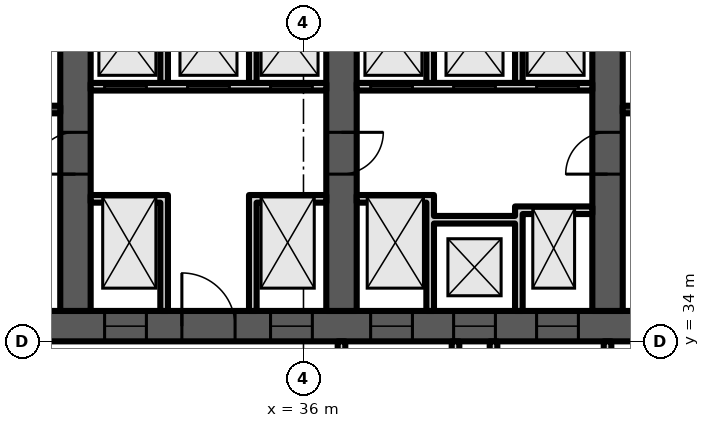
"""IFC4 building model, lengths in metres.
Left out: names, types, materials, properties, quantities, classifications, styles, units other than length and angle.
Written with IfcOpenShell. Run it as: python <this file> out.ifc"""

import sys

from ifc_helpers import new_model, si_unit, direction, frame, frame_2d, origin, place, context, subcontext, project, spatial, polyline, rectangle, outline, extrude, element, fill, save


model = new_model("IFC4")
c1 = context("Model", 3, precision=1e-05, world=origin(), true_north=direction((0.0, 1.0)))
c2 = subcontext(c1, "Body", "Model", "MODEL_VIEW")
j1 = project(units=[si_unit("LENGTHUNIT", "METRE"), si_unit("PLANEANGLEUNIT", "RADIAN")], contexts=[c1])
p1 = place(None, origin())
s1 = spatial("IfcSite", under=j1, at=p1, CompositionType="ELEMENT")
p2 = place(p1, origin())
s2 = spatial("IfcBuilding", under=s1, at=p2, CompositionType="ELEMENT")
p3 = place(p2, frame((0.0, 0.0, 177.1)))
s3 = spatial("IfcBuildingStorey", under=s2, at=p3, CompositionType="ELEMENT", Elevation=177.1)
p4 = place(p3, frame((16.0, 34.4, 0.0), z_axis=(0.0, 0.0, 1.0), x_axis=(1.0, 0.0, 0.0)))
e1 = element("IfcWall", 1, at=p4, inside=s3, PredefinedType="SHEAR", context=c2, shape_type="SweptSolid", body=[
    extrude(rectangle(XDim=42.0, YDim=0.8, at=frame_2d((21.0, 0.0))), origin(), (0.0, 0.0, 1.0), 3.6),
])
p5 = place(p4, frame((1.75, 0.0, 0.0)))
e2 = element("IfcOpeningElement", 2, at=p5, cuts=e1, PredefinedType="OPENING", context=c2, shape_type="SweptSolid", body=[
    extrude(rectangle(XDim=1.0, YDim=2.1, at=frame_2d((0.5, 1.05))), frame((0.0, 0.41, 0.0), z_axis=(0.0, -1.0, 0.0), x_axis=(1.0, 0.0, 0.0)), (0.0, 0.0, 1.0), 0.82),
])
p6 = place(p4, frame((4.65, 0.0, 0.0)))
e3 = element("IfcOpeningElement", 3, at=p6, cuts=e1, PredefinedType="OPENING", context=c2, shape_type="SweptSolid", body=[
    extrude(rectangle(XDim=1.0, YDim=2.1, at=frame_2d((0.5, 1.05))), frame((0.0, 0.41, 0.0), z_axis=(0.0, -1.0, 0.0), x_axis=(1.0, 0.0, 0.0)), (0.0, 0.0, 1.0), 0.82),
])
p7 = place(p4, frame((7.65, 0.0, 0.0)))
e4 = element("IfcOpeningElement", 4, at=p7, cuts=e1, PredefinedType="OPENING", context=c2, shape_type="SweptSolid", body=[
    extrude(rectangle(XDim=1.2, YDim=2.1, at=frame_2d((0.6, 1.05))), frame((0.0, 0.41, 0.0), z_axis=(0.0, -1.0, 0.0), x_axis=(1.0, 0.0, 0.0)), (0.0, 0.0, 1.0), 0.82),
])
p8 = place(p4, frame((14.767, 0.0, 0.0)))
e5 = element("IfcOpeningElement", 5, at=p8, cuts=e1, PredefinedType="OPENING", context=c2, shape_type="SweptSolid", body=[
    extrude(rectangle(XDim=1.1, YDim=2.1, at=frame_2d((0.55, 1.05))), frame((0.0, 0.41, 0.0), z_axis=(0.0, -1.0, 0.0), x_axis=(1.0, 0.0, 0.0)), (0.0, 0.0, 1.0), 0.82),
])
p9 = place(p4, frame((19.133, 0.0, 0.0)))
e6 = element("IfcOpeningElement", 6, at=p9, cuts=e1, PredefinedType="OPENING", context=c2, shape_type="SweptSolid", body=[
    extrude(rectangle(XDim=1.1, YDim=2.1, at=frame_2d((0.55, 1.05))), frame((0.0, 0.41, 0.0), z_axis=(0.0, -1.0, 0.0), x_axis=(1.0, 0.0, 0.0)), (0.0, 0.0, 1.0), 0.82),
])
p10 = place(p4, frame((16.8, 0.0, 0.0)))
e7 = element("IfcOpeningElement", 7, at=p10, cuts=e1, PredefinedType="OPENING", context=c2, shape_type="SweptSolid", body=[
    extrude(rectangle(XDim=1.4, YDim=2.1, at=frame_2d((0.7, 1.05))), frame((0.0, 0.41, 0.0), z_axis=(0.0, -1.0, 0.0), x_axis=(1.0, 0.0, 0.0)), (0.0, 0.0, 1.0), 0.82),
])
p11 = place(p4, frame((21.767, 0.0, 0.0)))
e8 = element("IfcOpeningElement", 8, at=p11, cuts=e1, PredefinedType="OPENING", context=c2, shape_type="SweptSolid", body=[
    extrude(rectangle(XDim=1.1, YDim=2.1, at=frame_2d((0.55, 1.05))), frame((0.0, 0.41, 0.0), z_axis=(0.0, -1.0, 0.0), x_axis=(1.0, 0.0, 0.0)), (0.0, 0.0, 1.0), 0.82),
])
p12 = place(p4, frame((23.95, 0.0, 0.0)))
e9 = element("IfcOpeningElement", 9, at=p12, cuts=e1, PredefinedType="OPENING", context=c2, shape_type="SweptSolid", body=[
    extrude(rectangle(XDim=1.1, YDim=2.1, at=frame_2d((0.55, 1.05))), frame((0.0, 0.41, 0.0), z_axis=(0.0, -1.0, 0.0), x_axis=(1.0, 0.0, 0.0)), (0.0, 0.0, 1.0), 0.82),
])
p13 = place(p4, frame((26.133, 0.0, 0.0)))
e10 = element("IfcOpeningElement", 10, at=p13, cuts=e1, PredefinedType="OPENING", context=c2, shape_type="SweptSolid", body=[
    extrude(rectangle(XDim=1.1, YDim=2.1, at=frame_2d((0.55, 1.05))), frame((0.0, 0.41, 0.0), z_axis=(0.0, -1.0, 0.0), x_axis=(1.0, 0.0, 0.0)), (0.0, 0.0, 1.0), 0.82),
])
p14 = place(p4, frame((33.15, 0.0, 0.0)))
e11 = element("IfcOpeningElement", 11, at=p14, cuts=e1, PredefinedType="OPENING", context=c2, shape_type="SweptSolid", body=[
    extrude(rectangle(XDim=1.2, YDim=2.1, at=frame_2d((0.6, 1.05))), frame((0.0, 0.41, 0.0), z_axis=(0.0, -1.0, 0.0), x_axis=(1.0, 0.0, 0.0)), (0.0, 0.0, 1.0), 0.82),
])
p15 = place(p4, frame((35.817, 0.0, 0.0)))
e12 = element("IfcOpeningElement", 12, at=p15, cuts=e1, PredefinedType="OPENING", context=c2, shape_type="SweptSolid", body=[
    extrude(rectangle(XDim=1.0, YDim=2.1, at=frame_2d((0.5, 1.05))), frame((0.0, 0.41, 0.0), z_axis=(0.0, -1.0, 0.0), x_axis=(1.0, 0.0, 0.0)), (0.0, 0.0, 1.0), 0.82),
])
p16 = place(p4, frame((39.95, 0.0, 0.0)))
e13 = element("IfcOpeningElement", 13, at=p16, cuts=e1, PredefinedType="OPENING", context=c2, shape_type="SweptSolid", body=[
    extrude(rectangle(XDim=1.0, YDim=2.1, at=frame_2d((0.5, 1.05))), frame((0.0, 0.41, 0.0), z_axis=(0.0, -1.0, 0.0), x_axis=(1.0, 0.0, 0.0)), (0.0, 0.0, 1.0), 0.82),
])
p17 = place(p4, frame((37.767, 0.0, 0.0)))
e14 = element("IfcOpeningElement", 14, at=p17, cuts=e1, PredefinedType="OPENING", context=c2, shape_type="SweptSolid", body=[
    extrude(rectangle(XDim=1.4, YDim=2.1, at=frame_2d((0.7, 1.05))), frame((0.0, 0.41, 0.0), z_axis=(0.0, -1.0, 0.0), x_axis=(1.0, 0.0, 0.0)), (0.0, 0.0, 1.0), 0.82),
])
p18 = place(p3, frame((30.0, 34.8, 0.0), z_axis=(0.0, 0.0, 1.0), x_axis=(0.0, 1.0, 0.0)))
e15 = element("IfcWall", 15, at=p18, inside=s3, PredefinedType="SHEAR", context=c2, shape_type="SweptSolid", body=[
    extrude(rectangle(XDim=14.374, YDim=0.8, at=frame_2d((7.187, 0.0))), origin(), (0.0, 0.0, 1.0), 3.6),
])
p19 = place(p18, frame((3.6, 0.0, 0.0)))
e16 = element("IfcOpeningElement", 16, at=p19, cuts=e15, PredefinedType="OPENING", context=c2, shape_type="SweptSolid", body=[
    extrude(rectangle(XDim=1.1, YDim=2.1, at=frame_2d((0.55, 1.05))), frame((0.0, 0.41, 0.0), z_axis=(0.0, -1.0, 0.0), x_axis=(1.0, 0.0, 0.0)), (0.0, 0.0, 1.0), 0.82),
])
p20 = place(p3, frame((37.0, 34.8, 0.0), z_axis=(0.0, 0.0, 1.0), x_axis=(0.0, 1.0, 0.0)))
e17 = element("IfcWall", 17, at=p20, inside=s3, PredefinedType="SHEAR", context=c2, shape_type="SweptSolid", body=[
    extrude(rectangle(XDim=14.987, YDim=0.8, at=frame_2d((7.493, 0.0))), origin(), (0.0, 0.0, 1.0), 3.6),
])
p21 = place(p20, frame((11.312, 0.0, 0.0)))
e18 = element("IfcOpeningElement", 18, at=p21, cuts=e17, PredefinedType="OPENING", context=c2, shape_type="SweptSolid", body=[
    extrude(rectangle(XDim=1.0, YDim=2.1, at=frame_2d((0.5, 1.05))), frame((0.0, 0.41, 0.0), z_axis=(0.0, -1.0, 0.0), x_axis=(1.0, 0.0, 0.0)), (0.0, 0.0, 1.0), 0.82),
])
p22 = place(p20, frame((3.6, 0.0, 0.0)))
e19 = element("IfcOpeningElement", 19, at=p22, cuts=e17, PredefinedType="OPENING", context=c2, shape_type="SweptSolid", body=[
    extrude(rectangle(XDim=1.1, YDim=2.1, at=frame_2d((0.55, 1.05))), frame((0.0, 0.41, 0.0), z_axis=(0.0, -1.0, 0.0), x_axis=(1.0, 0.0, 0.0)), (0.0, 0.0, 1.0), 0.82),
])
p23 = place(p3, frame((44.0, 34.8, 0.0), z_axis=(0.0, 0.0, 1.0), x_axis=(0.0, 1.0, 0.0)))
e20 = element("IfcWall", 20, at=p23, inside=s3, PredefinedType="SHEAR", context=c2, shape_type="SweptSolid", body=[
    extrude(rectangle(XDim=14.374, YDim=0.8, at=frame_2d((7.187, 0.0))), origin(), (0.0, 0.0, 1.0), 3.6),
])
p24 = place(p23, frame((11.312, 0.0, 0.0)))
e21 = element("IfcOpeningElement", 21, at=p24, cuts=e20, PredefinedType="OPENING", context=c2, shape_type="SweptSolid", body=[
    extrude(rectangle(XDim=1.0, YDim=2.1, at=frame_2d((0.5, 1.05))), frame((0.0, 0.41, 0.0), z_axis=(0.0, -1.0, 0.0), x_axis=(1.0, 0.0, 0.0)), (0.0, 0.0, 1.0), 0.82),
])
p25 = place(p23, frame((3.6, 0.0, 0.0)))
e22 = element("IfcOpeningElement", 22, at=p25, cuts=e20, PredefinedType="OPENING", context=c2, shape_type="SweptSolid", body=[
    extrude(rectangle(XDim=1.1, YDim=2.1, at=frame_2d((0.55, 1.05))), frame((0.0, 0.41, 0.0), z_axis=(0.0, -1.0, 0.0), x_axis=(1.0, 0.0, 0.0)), (0.0, 0.0, 1.0), 0.82),
])
p26 = place(p3, frame((23.4, 40.1, 0.0), z_axis=(0.0, 0.0, 1.0), x_axis=(1.0, 0.0, 0.0)))
e23 = element("IfcWall", 23, at=p26, inside=s3, PredefinedType="SHEAR", context=c2, shape_type="SweptSolid", body=[
    extrude(rectangle(XDim=6.2, YDim=0.2, at=frame_2d((3.1, 0.0))), origin(), (0.0, 0.0, 1.0), 3.2),
])
p27 = place(p26, frame((3.525, 0.0, 0.0)))
e24 = element("IfcOpeningElement", 24, at=p27, cuts=e23, PredefinedType="OPENING", context=c2, shape_type="SweptSolid", body=[
    extrude(rectangle(XDim=1.2, YDim=2.1, at=frame_2d((0.6, 1.05))), frame((0.0, 0.11, 0.0), z_axis=(0.0, -1.0, 0.0), x_axis=(1.0, 0.0, 0.0)), (0.0, 0.0, 1.0), 0.22),
])
p28 = place(p26, frame((0.575, 0.0, 0.0)))
e25 = element("IfcOpeningElement", 25, at=p28, cuts=e23, PredefinedType="OPENING", context=c2, shape_type="SweptSolid", body=[
    extrude(rectangle(XDim=0.9, YDim=2.1, at=frame_2d((0.45, 1.05))), frame((0.0, 0.11, 0.0), z_axis=(0.0, -1.0, 0.0), x_axis=(1.0, 0.0, 0.0)), (0.0, 0.0, 1.0), 0.22),
])
p29 = place(p3, frame((30.4, 40.7, 0.0), z_axis=(0.0, 0.0, 1.0), x_axis=(1.0, 0.0, 0.0)))
e26 = element("IfcWall", 26, at=p29, inside=s3, PredefinedType="PARTITIONING", context=c2, shape_type="SweptSolid", body=[
    extrude(rectangle(XDim=6.2, YDim=0.2, at=frame_2d((3.1, 0.0))), origin(), (0.0, 0.0, 1.0), 3.2),
])
p30 = place(p29, frame((0.367, 0.0, 0.0)))
e27 = element("IfcOpeningElement", 27, at=p30, cuts=e26, PredefinedType="OPENING", context=c2, shape_type="SweptSolid", body=[
    extrude(rectangle(XDim=1.1, YDim=2.1, at=frame_2d((0.55, 1.05))), frame((0.0, 0.11, 0.0), z_axis=(0.0, -1.0, 0.0), x_axis=(1.0, 0.0, 0.0)), (0.0, 0.0, 1.0), 0.22),
])
p31 = place(p29, frame((2.55, 0.0, 0.0)))
e28 = element("IfcOpeningElement", 28, at=p31, cuts=e26, PredefinedType="OPENING", context=c2, shape_type="SweptSolid", body=[
    extrude(rectangle(XDim=1.1, YDim=2.1, at=frame_2d((0.55, 1.05))), frame((0.0, 0.11, 0.0), z_axis=(0.0, -1.0, 0.0), x_axis=(1.0, 0.0, 0.0)), (0.0, 0.0, 1.0), 0.22),
])
p32 = place(p29, frame((4.733, 0.0, 0.0)))
e29 = element("IfcOpeningElement", 29, at=p32, cuts=e26, PredefinedType="OPENING", context=c2, shape_type="SweptSolid", body=[
    extrude(rectangle(XDim=1.1, YDim=2.1, at=frame_2d((0.55, 1.05))), frame((0.0, 0.11, 0.0), z_axis=(0.0, -1.0, 0.0), x_axis=(1.0, 0.0, 0.0)), (0.0, 0.0, 1.0), 0.22),
])
p33 = place(p3, frame((0.0, 0.0, -0.0)))
e30 = element("IfcWall", 30, at=p33, inside=s3, PredefinedType="PARTITIONING", context=c2, shape_type="SweptSolid", body=[
    extrude(outline(polyline([(32.233, 37.65), (30.4, 37.65), (30.4, 37.85), (32.233, 37.85), (32.433, 37.85), (32.433, 34.8), (32.233, 34.8), (32.233, 37.65)])), origin(), (0.0, 0.0, 1.0), 3.2),
])
p34 = place(p3, frame((0.0, 0.0, -0.0)))
e31 = element("IfcWall", 31, at=p34, inside=s3, PredefinedType="PARTITIONING", context=c2, shape_type="SweptSolid", body=[
    extrude(outline(polyline([(34.567, 37.85), (34.767, 37.85), (36.6, 37.85), (36.6, 37.65), (34.767, 37.65), (34.767, 34.8), (34.567, 34.8), (34.567, 37.85)])), origin(), (0.0, 0.0, 1.0), 3.2),
])
p35 = place(p3, frame((0.0, 0.0, -0.0)))
e32 = element("IfcWall", 32, at=p35, inside=s3, PredefinedType="PARTITIONING", context=c2, shape_type="SweptSolid", body=[
    extrude(outline(polyline([(32.433, 40.8), (32.233, 40.8), (32.233, 43.8), (30.4, 43.8), (30.4, 44.0), (36.6, 44.0), (36.6, 43.8), (34.767, 43.8), (34.767, 40.8), (34.567, 40.8), (34.567, 43.8), (32.433, 43.8), (32.433, 40.8)])), origin(), (0.0, 0.0, 1.0), 3.2),
])
p36 = place(p3, frame((37.4, 40.7, 0.0), z_axis=(0.0, 0.0, 1.0), x_axis=(1.0, 0.0, 0.0)))
e33 = element("IfcWall", 33, at=p36, inside=s3, PredefinedType="PARTITIONING", context=c2, shape_type="SweptSolid", body=[
    extrude(rectangle(XDim=6.2, YDim=0.2, at=frame_2d((3.1, 0.0))), origin(), (0.0, 0.0, 1.0), 3.2),
])
p37 = place(p36, frame((0.367, 0.0, 0.0)))
e34 = element("IfcOpeningElement", 34, at=p37, cuts=e33, PredefinedType="OPENING", context=c2, shape_type="SweptSolid", body=[
    extrude(rectangle(XDim=1.1, YDim=2.1, at=frame_2d((0.55, 1.05))), frame((0.0, 0.11, 0.0), z_axis=(0.0, -1.0, 0.0), x_axis=(1.0, 0.0, 0.0)), (0.0, 0.0, 1.0), 0.22),
])
p38 = place(p36, frame((2.55, 0.0, 0.0)))
e35 = element("IfcOpeningElement", 35, at=p38, cuts=e33, PredefinedType="OPENING", context=c2, shape_type="SweptSolid", body=[
    extrude(rectangle(XDim=1.1, YDim=2.1, at=frame_2d((0.55, 1.05))), frame((0.0, 0.11, 0.0), z_axis=(0.0, -1.0, 0.0), x_axis=(1.0, 0.0, 0.0)), (0.0, 0.0, 1.0), 0.22),
])
p39 = place(p36, frame((4.733, 0.0, 0.0)))
e36 = element("IfcOpeningElement", 36, at=p39, cuts=e33, PredefinedType="OPENING", context=c2, shape_type="SweptSolid", body=[
    extrude(rectangle(XDim=1.1, YDim=2.1, at=frame_2d((0.55, 1.05))), frame((0.0, 0.11, 0.0), z_axis=(0.0, -1.0, 0.0), x_axis=(1.0, 0.0, 0.0)), (0.0, 0.0, 1.0), 0.22),
])
p40 = place(p3, frame((0.0, 0.0, -0.0)))
e37 = element("IfcWall", 37, at=p40, inside=s3, PredefinedType="PARTITIONING", context=c2, shape_type="SweptSolid", body=[
    extrude(outline(polyline([(41.567, 37.1), (39.433, 37.1), (39.433, 34.8), (39.233, 34.8), (39.233, 37.65), (37.4, 37.65), (37.4, 37.85), (39.233, 37.85), (39.433, 37.85), (39.433, 37.3), (41.567, 37.3), (41.567, 37.55), (41.767, 37.55), (43.6, 37.55), (43.6, 37.35), (41.767, 37.35), (41.767, 34.8), (41.567, 34.8), (41.567, 37.1)])), origin(), (0.0, 0.0, 1.0), 3.2),
])
p41 = place(p3, frame((0.0, 0.0, -0.0)))
e38 = element("IfcWall", 38, at=p41, inside=s3, PredefinedType="PARTITIONING", context=c2, shape_type="SweptSolid", body=[
    extrude(outline(polyline([(39.433, 40.8), (39.233, 40.8), (39.233, 43.8), (37.4, 43.8), (37.4, 44.0), (43.6, 44.0), (43.6, 43.8), (41.767, 43.8), (41.767, 40.8), (41.567, 40.8), (41.567, 43.8), (39.433, 43.8), (39.433, 40.8)])), origin(), (0.0, 0.0, 1.0), 3.2),
])
p42 = place(p3, frame((44.4, 40.1, 0.0), z_axis=(0.0, 0.0, 1.0), x_axis=(1.0, 0.0, 0.0)))
e39 = element("IfcWall", 39, at=p42, inside=s3, PredefinedType="SHEAR", context=c2, shape_type="SweptSolid", body=[
    extrude(rectangle(XDim=6.2, YDim=0.2, at=frame_2d((3.1, 0.0))), origin(), (0.0, 0.0, 1.0), 3.2),
])
p43 = place(p42, frame((3.525, 0.0, 0.0)))
e40 = element("IfcOpeningElement", 40, at=p43, cuts=e39, PredefinedType="OPENING", context=c2, shape_type="SweptSolid", body=[
    extrude(rectangle(XDim=1.2, YDim=2.1, at=frame_2d((0.6, 1.05))), frame((0.0, 0.11, 0.0), z_axis=(0.0, -1.0, 0.0), x_axis=(1.0, 0.0, 0.0)), (0.0, 0.0, 1.0), 0.22),
])
p44 = place(p42, frame((0.575, 0.0, 0.0)))
e41 = element("IfcOpeningElement", 41, at=p44, cuts=e39, PredefinedType="OPENING", context=c2, shape_type="SweptSolid", body=[
    extrude(rectangle(XDim=0.9, YDim=2.1, at=frame_2d((0.45, 1.05))), frame((0.0, 0.11, 0.0), z_axis=(0.0, -1.0, 0.0), x_axis=(1.0, 0.0, 0.0)), (0.0, 0.0, 1.0), 0.22),
])
p45 = place(p3, frame((37.0, 30.5, 0.0), z_axis=(0.0, 0.0, 1.0), x_axis=(0.0, 1.0, 0.0)))
e42 = element("IfcWall", 42, at=p45, inside=s3, PredefinedType="PARTITIONING", context=c2, shape_type="SweptSolid", body=[
    extrude(rectangle(XDim=3.5, YDim=0.2, at=frame_2d((1.75, 0.0))), origin(), (0.0, 0.0, 1.0), 3.2),
])
p46 = place(p45, frame((1.2, 0.0, 0.0)))
e43 = element("IfcOpeningElement", 43, at=p46, cuts=e42, PredefinedType="OPENING", context=c2, shape_type="SweptSolid", body=[
    extrude(rectangle(XDim=1.1, YDim=2.1, at=frame_2d((0.55, 1.05))), frame((0.0, 0.11, 0.0), z_axis=(0.0, -1.0, 0.0), x_axis=(1.0, 0.0, 0.0)), (0.0, 0.0, 1.0), 0.22),
])
for number, where, z_axis, x_axis in (
    (44, (40.0, 30.5, 0.0), (0.0, 0.0, 1.0), (0.0, 1.0, 0.0)),
    (45, (41.0, 30.5, 0.0), (0.0, 0.0, 1.0), (0.0, 1.0, 0.0)),
):
    element("IfcWall", number, at=place(p3, frame(where, z_axis=z_axis, x_axis=x_axis)), inside=s3, PredefinedType="PARTITIONING", context=c2, shape_type="SweptSolid", body=[
        extrude(rectangle(XDim=3.5, YDim=0.2, at=frame_2d((1.75, 0.0))), origin(), (0.0, 0.0, 1.0), 3.2),
    ])
p47 = place(p3, frame((44.0, 30.5, 0.0), z_axis=(0.0, 0.0, 1.0), x_axis=(0.0, 1.0, 0.0)))
e46 = element("IfcWall", 46, at=p47, inside=s3, PredefinedType="PARTITIONING", context=c2, shape_type="SweptSolid", body=[
    extrude(rectangle(XDim=3.5, YDim=0.2, at=frame_2d((1.75, 0.0))), origin(), (0.0, 0.0, 1.0), 3.2),
])
p48 = place(p47, frame((1.2, 0.0, 0.0)))
e47 = element("IfcOpeningElement", 47, at=p48, cuts=e46, PredefinedType="OPENING", context=c2, shape_type="SweptSolid", body=[
    extrude(rectangle(XDim=1.1, YDim=2.1, at=frame_2d((0.55, 1.05))), frame((0.0, 0.11, 0.0), z_axis=(0.0, -1.0, 0.0), x_axis=(1.0, 0.0, 0.0)), (0.0, 0.0, 1.0), 0.22),
])
p49 = place(p8, origin())
e48 = element("IfcDoor", 48, at=p49, inside=s3, OperationType="DOUBLE_DOOR_SLIDING", PredefinedType="DOOR", context=c2, shape_type="SweptSolid", body=[
    extrude(rectangle(XDim=1.1, YDim=2.1, at=frame_2d((0.55, 1.05))), frame((0.0, 0.025, 0.0), z_axis=(0.0, -1.0, 0.0), x_axis=(1.0, 0.0, 0.0)), (0.0, 0.0, 1.0), 0.05),
])
fill(e5, e48)
p50 = place(p9, origin())
e49 = element("IfcDoor", 49, at=p50, inside=s3, OperationType="DOUBLE_DOOR_SLIDING", PredefinedType="DOOR", context=c2, shape_type="SweptSolid", body=[
    extrude(rectangle(XDim=1.1, YDim=2.1, at=frame_2d((0.55, 1.05))), frame((0.0, 0.025, 0.0), z_axis=(0.0, -1.0, 0.0), x_axis=(1.0, 0.0, 0.0)), (0.0, 0.0, 1.0), 0.05),
])
fill(e6, e49)
p51 = place(p10, origin())
e50 = element("IfcDoor", 50, at=p51, inside=s3, OperationType="DOUBLE_DOOR_SINGLE_SWING", PredefinedType="DOOR", context=c2, shape_type="SweptSolid", body=[
    extrude(rectangle(XDim=1.4, YDim=2.1, at=frame_2d((0.7, 1.05))), frame((0.0, 0.025, 0.0), z_axis=(0.0, -1.0, 0.0), x_axis=(1.0, 0.0, 0.0)), (0.0, 0.0, 1.0), 0.05),
])
fill(e7, e50)
p52 = place(p30, origin())
e51 = element("IfcDoor", 51, at=p52, inside=s3, OperationType="DOUBLE_DOOR_SLIDING", PredefinedType="DOOR", context=c2, shape_type="SweptSolid", body=[
    extrude(rectangle(XDim=1.1, YDim=2.1, at=frame_2d((0.55, 1.05))), frame((0.0, 0.025, 0.0), z_axis=(0.0, -1.0, 0.0), x_axis=(1.0, 0.0, 0.0)), (0.0, 0.0, 1.0), 0.05),
])
fill(e27, e51)
p53 = place(p31, origin())
e52 = element("IfcDoor", 52, at=p53, inside=s3, OperationType="DOUBLE_DOOR_SLIDING", PredefinedType="DOOR", context=c2, shape_type="SweptSolid", body=[
    extrude(rectangle(XDim=1.1, YDim=2.1, at=frame_2d((0.55, 1.05))), frame((0.0, 0.025, 0.0), z_axis=(0.0, -1.0, 0.0), x_axis=(1.0, 0.0, 0.0)), (0.0, 0.0, 1.0), 0.05),
])
fill(e28, e52)
p54 = place(p32, origin())
e53 = element("IfcDoor", 53, at=p54, inside=s3, OperationType="DOUBLE_DOOR_SLIDING", PredefinedType="DOOR", context=c2, shape_type="SweptSolid", body=[
    extrude(rectangle(XDim=1.1, YDim=2.1, at=frame_2d((0.55, 1.05))), frame((0.0, 0.025, 0.0), z_axis=(0.0, -1.0, 0.0), x_axis=(1.0, 0.0, 0.0)), (0.0, 0.0, 1.0), 0.05),
])
fill(e29, e53)
p55 = place(p11, origin())
e54 = element("IfcDoor", 54, at=p55, inside=s3, OperationType="DOUBLE_DOOR_SLIDING", PredefinedType="DOOR", context=c2, shape_type="SweptSolid", body=[
    extrude(rectangle(XDim=1.1, YDim=2.1, at=frame_2d((0.55, 1.05))), frame((0.0, 0.025, 0.0), z_axis=(0.0, -1.0, 0.0), x_axis=(1.0, 0.0, 0.0)), (0.0, 0.0, 1.0), 0.05),
])
fill(e8, e54)
p56 = place(p12, origin())
e55 = element("IfcDoor", 55, at=p56, inside=s3, OperationType="DOUBLE_DOOR_SLIDING", PredefinedType="DOOR", context=c2, shape_type="SweptSolid", body=[
    extrude(rectangle(XDim=1.1, YDim=2.1, at=frame_2d((0.55, 1.05))), frame((0.0, 0.025, 0.0), z_axis=(0.0, -1.0, 0.0), x_axis=(1.0, 0.0, 0.0)), (0.0, 0.0, 1.0), 0.05),
])
fill(e9, e55)
p57 = place(p13, origin())
e56 = element("IfcDoor", 56, at=p57, inside=s3, OperationType="DOUBLE_DOOR_SLIDING", PredefinedType="DOOR", context=c2, shape_type="SweptSolid", body=[
    extrude(rectangle(XDim=1.1, YDim=2.1, at=frame_2d((0.55, 1.05))), frame((0.0, 0.025, 0.0), z_axis=(0.0, -1.0, 0.0), x_axis=(1.0, 0.0, 0.0)), (0.0, 0.0, 1.0), 0.05),
])
fill(e10, e56)
p58 = place(p37, origin())
e57 = element("IfcDoor", 57, at=p58, inside=s3, OperationType="DOUBLE_DOOR_SLIDING", PredefinedType="DOOR", context=c2, shape_type="SweptSolid", body=[
    extrude(rectangle(XDim=1.1, YDim=2.1, at=frame_2d((0.55, 1.05))), frame((0.0, 0.025, 0.0), z_axis=(0.0, -1.0, 0.0), x_axis=(1.0, 0.0, 0.0)), (0.0, 0.0, 1.0), 0.05),
])
fill(e34, e57)
p59 = place(p38, origin())
e58 = element("IfcDoor", 58, at=p59, inside=s3, OperationType="DOUBLE_DOOR_SLIDING", PredefinedType="DOOR", context=c2, shape_type="SweptSolid", body=[
    extrude(rectangle(XDim=1.1, YDim=2.1, at=frame_2d((0.55, 1.05))), frame((0.0, 0.025, 0.0), z_axis=(0.0, -1.0, 0.0), x_axis=(1.0, 0.0, 0.0)), (0.0, 0.0, 1.0), 0.05),
])
fill(e35, e58)
p60 = place(p39, origin())
e59 = element("IfcDoor", 59, at=p60, inside=s3, OperationType="DOUBLE_DOOR_SLIDING", PredefinedType="DOOR", context=c2, shape_type="SweptSolid", body=[
    extrude(rectangle(XDim=1.1, YDim=2.1, at=frame_2d((0.55, 1.05))), frame((0.0, 0.025, 0.0), z_axis=(0.0, -1.0, 0.0), x_axis=(1.0, 0.0, 0.0)), (0.0, 0.0, 1.0), 0.05),
])
fill(e36, e59)
p61 = place(p19, origin())
e60 = element("IfcDoor", 60, at=p61, inside=s3, OperationType="SINGLE_SWING_LEFT", PredefinedType="DOOR", context=c2, shape_type="SweptSolid", body=[
    extrude(rectangle(XDim=1.1, YDim=2.1, at=frame_2d((0.55, 1.05))), frame((0.0, 0.025, 0.0), z_axis=(0.0, -1.0, 0.0), x_axis=(1.0, 0.0, 0.0)), (0.0, 0.0, 1.0), 0.05),
])
fill(e16, e60)
p62 = place(p22, origin())
e61 = element("IfcDoor", 61, at=p62, inside=s3, OperationType="SINGLE_SWING_RIGHT", PredefinedType="DOOR", context=c2, shape_type="SweptSolid", body=[
    extrude(rectangle(XDim=1.1, YDim=2.1, at=frame_2d((0.55, 1.05))), frame((0.0, 0.025, 0.0), z_axis=(0.0, -1.0, 0.0), x_axis=(1.0, 0.0, 0.0)), (0.0, 0.0, 1.0), 0.05),
])
fill(e19, e61)
p63 = place(p25, origin())
e62 = element("IfcDoor", 62, at=p63, inside=s3, OperationType="SINGLE_SWING_LEFT", PredefinedType="DOOR", context=c2, shape_type="SweptSolid", body=[
    extrude(rectangle(XDim=1.1, YDim=2.1, at=frame_2d((0.55, 1.05))), frame((0.0, 0.025, 0.0), z_axis=(0.0, -1.0, 0.0), x_axis=(1.0, 0.0, 0.0)), (0.0, 0.0, 1.0), 0.05),
])
fill(e22, e62)
save(model, sys.argv[1])
